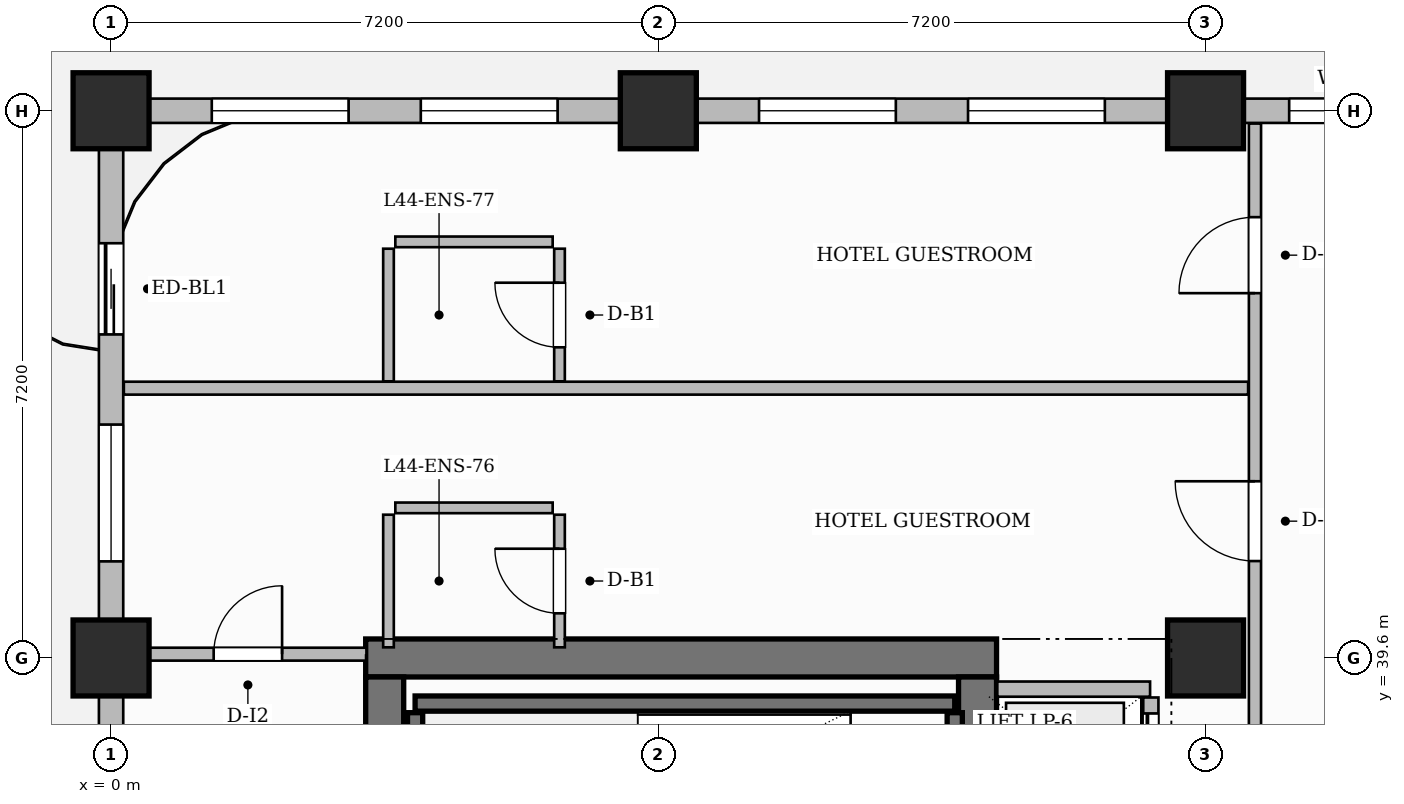
"""IFC4 building model, lengths in metres.
Left out: names, types, materials, properties, quantities, classifications, styles, units other than length and angle.
Written with IfcOpenShell. Run it as: python <this file> out.ifc"""

import sys

from ifc_helpers import new_model, si_unit, direction, frame, frame_2d, origin, origin_2d, place, context, subcontext, project, spatial, rectangle, extrude, source, transform, mapped, element, fill, save


model = new_model("IFC4")
c1 = context("Model", 3, precision=1e-05, world=origin(), true_north=direction((0.0, 1.0)))
c2 = subcontext(c1, "Body", "Model", "MODEL_VIEW")
j1 = project(units=[si_unit("LENGTHUNIT", "METRE"), si_unit("PLANEANGLEUNIT", "RADIAN")], contexts=[c1])
p1 = place(None, origin())
s1 = spatial("IfcSite", under=j1, at=p1, CompositionType="ELEMENT")
p2 = place(p1, origin())
s2 = spatial("IfcBuilding", under=s1, at=p2, CompositionType="ELEMENT")
p3 = place(p2, frame((0.0, 0.0, 177.25)))
s3 = spatial("IfcBuildingStorey", under=s2, at=p3, CompositionType="ELEMENT", Elevation=177.25)
p4 = place(p3, frame((3.35, 39.6, 0.0), z_axis=(0.0, 0.0, 1.0), x_axis=(1.0, 0.0, 0.0)))
e1 = element("IfcWall", 1, at=p4, inside=s3, PredefinedType="SHEAR", context=c2, shape_type="SweptSolid", body=[
    extrude(rectangle(XDim=8.3, YDim=0.5, at=frame_2d((4.15, 0.0))), origin(), (0.0, 0.0, 1.0), 3.85),
])
p5 = place(p3, frame((3.6, 25.45, 0.0), z_axis=(0.0, 0.0, 1.0), x_axis=(0.0, 1.0, 0.0)))
e2 = element("IfcWall", 2, at=p5, inside=s3, PredefinedType="SHEAR", context=c2, shape_type="SweptSolid", body=[
    extrude(rectangle(XDim=13.9, YDim=0.5, at=frame_2d((6.95, 0.0))), origin(), (0.0, 0.0, 1.0), 3.85),
])
p6 = place(p3, frame((11.4, 25.45, 0.0), z_axis=(0.0, 0.0, 1.0), x_axis=(0.0, 1.0, 0.0)))
e3 = element("IfcWall", 3, at=p6, inside=s3, PredefinedType="SHEAR", context=c2, shape_type="SweptSolid", body=[
    extrude(rectangle(XDim=13.9, YDim=0.5, at=frame_2d((6.95, 0.0))), origin(), (0.0, 0.0, 1.0), 3.85),
])
p7 = place(p6, frame((6.52, 0.0, 0.0)))
e4 = element("IfcOpeningElement", 4, at=p7, cuts=e3, PredefinedType="OPENING", context=c2, shape_type="SweptSolid", body=[
    extrude(rectangle(XDim=1.5, YDim=2.2, at=frame_2d((0.75, 1.1))), frame((0.0, 0.26, 0.0), z_axis=(0.0, -1.0, 0.0), x_axis=(1.0, 0.0, 0.0)), (0.0, 0.0, 1.0), 0.52),
])
m1 = source(origin(), c2, "Body", "SweptSolid", [
    extrude(rectangle(XDim=1.0, YDim=1.0, at=origin_2d()), origin(), (0.0, 0.0, 1.0), 3.85),
])
for number, where, z_axis, x_axis in (
    (5, (0.0, 39.6, 0.0), (0.0, 0.0, 1.0), (1.0, 0.0, 0.0)),
    (6, (0.0, 46.8, 0.0), (0.0, 0.0, 1.0), (1.0, 0.0, 0.0)),
    (7, (7.2, 46.8, 0.0), (0.0, 0.0, 1.0), (1.0, 0.0, 0.0)),
    (8, (14.4, 39.6, 0.0), (0.0, 0.0, 1.0), (1.0, 0.0, 0.0)),
    (9, (14.4, 46.8, 0.0), (0.0, 0.0, 1.0), (1.0, 0.0, 0.0)),
):
    element("IfcColumn", number, at=place(p3, frame(where, z_axis=z_axis, x_axis=x_axis)), inside=s3, PredefinedType="COLUMN", context=c2, shape_type="MappedRepresentation", body=[
        mapped(m1, transform((0.0, 0.0, 0.0), scale=1.0)),
    ])
p8 = place(p3, frame((4.0, 39.0, 0.0), z_axis=(0.0, 0.0, 1.0), x_axis=(1.0, 0.0, 0.0)))
e10 = element("IfcWall", 10, at=p8, inside=s3, PredefinedType="SHEAR", context=c2, shape_type="SweptSolid", body=[
    extrude(rectangle(XDim=7.1, YDim=0.2, at=frame_2d((3.55, 0.0))), origin(), (0.0, 0.0, 1.0), 3.85),
])
for number, where, z_axis, x_axis in (
    (11, (4.0, 36.18, 0.0), (0.0, 0.0, 1.0), (0.0, 1.0, 0.0)),
    (12, (11.1, 36.18, 0.0), (0.0, 0.0, 1.0), (0.0, 1.0, 0.0)),
):
    element("IfcWall", number, at=place(p3, frame(where, z_axis=z_axis, x_axis=x_axis)), inside=s3, PredefinedType="SHEAR", context=c2, shape_type="SweptSolid", body=[
        extrude(rectangle(XDim=2.7, YDim=0.2, at=frame_2d((1.35, 0.0))), origin(), (0.0, 0.0, 1.0), 3.85),
    ])
p9 = place(p3, frame((11.66, 39.19, 0.0), z_axis=(0.0, 0.0, 1.0), x_axis=(1.0, 0.0, 0.0)))
e13 = element("IfcWall", 13, at=p9, inside=s3, PredefinedType="PARTITIONING", context=c2, shape_type="SweptSolid", body=[
    extrude(rectangle(XDim=2.01, YDim=0.2, at=frame_2d((1.005, 0.0))), origin(), (0.0, 0.0, 1.0), 3.6),
])
p10 = place(p3, frame((13.68, 34.36, 0.0), z_axis=(0.0, 0.0, 1.0), x_axis=(0.0, 1.0, 0.0)))
e14 = element("IfcWall", 14, at=p10, inside=s3, PredefinedType="PARTITIONING", context=c2, shape_type="SweptSolid", body=[
    extrude(rectangle(XDim=4.72, YDim=0.2, at=frame_2d((2.36, 0.0))), origin(), (0.0, 0.0, 1.0), 3.6),
])
p11 = place(p10, frame((0.21, 0.0, 0.0)))
e15 = element("IfcOpeningElement", 15, at=p11, cuts=e14, PredefinedType="OPENING", context=c2, shape_type="SweptSolid", body=[
    extrude(rectangle(XDim=1.1, YDim=2.2, at=frame_2d((0.55, 1.1))), frame((0.0, 0.11, 0.0), z_axis=(0.0, -1.0, 0.0), x_axis=(1.0, 0.0, 0.0)), (0.0, 0.0, 1.0), 0.22),
])
p12 = place(p10, frame((1.81, 0.0, 0.0)))
e16 = element("IfcOpeningElement", 16, at=p12, cuts=e14, PredefinedType="OPENING", context=c2, shape_type="SweptSolid", body=[
    extrude(rectangle(XDim=1.1, YDim=2.2, at=frame_2d((0.55, 1.1))), frame((0.0, 0.11, 0.0), z_axis=(0.0, -1.0, 0.0), x_axis=(1.0, 0.0, 0.0)), (0.0, 0.0, 1.0), 0.22),
])
p13 = place(p10, frame((3.41, 0.0, 0.0)))
e17 = element("IfcOpeningElement", 17, at=p13, cuts=e14, PredefinedType="OPENING", context=c2, shape_type="SweptSolid", body=[
    extrude(rectangle(XDim=1.1, YDim=2.2, at=frame_2d((0.55, 1.1))), frame((0.0, 0.11, 0.0), z_axis=(0.0, -1.0, 0.0), x_axis=(1.0, 0.0, 0.0)), (0.0, 0.0, 1.0), 0.22),
])
p14 = place(p3, frame((0.24, 39.65, 0.0), z_axis=(0.0, 0.0, 1.0), x_axis=(1.0, 0.0, 0.0)))
e18 = element("IfcWall", 18, at=p14, inside=s3, PredefinedType="PARTITIONING", context=c2, shape_type="SweptSolid", body=[
    extrude(rectangle(XDim=3.12, YDim=0.17, at=frame_2d((1.56, 0.0))), origin(), (0.0, 0.0, 1.0), 3.6),
])
p15 = place(p14, frame((1.11, 0.0, 0.0)))
e19 = element("IfcOpeningElement", 19, at=p15, cuts=e18, PredefinedType="OPENING", context=c2, shape_type="SweptSolid", body=[
    extrude(rectangle(XDim=0.9, YDim=2.15, at=frame_2d((0.45, 1.075))), frame((0.0, 0.095, 0.0), z_axis=(0.0, -1.0, 0.0), x_axis=(1.0, 0.0, 0.0)), (0.0, 0.0, 1.0), 0.19),
])
p16 = place(p3, frame((15.05, 34.34, 0.0), z_axis=(0.0, 0.0, 1.0), x_axis=(0.0, 1.0, 0.0)))
e20 = element("IfcWall", 20, at=p16, inside=s3, PredefinedType="PARTITIONING", context=c2, shape_type="SweptSolid", body=[
    extrude(rectangle(XDim=12.292, YDim=0.16, at=frame_2d((6.146, 0.0))), origin(), (0.0, 0.0, 1.0), 3.6),
])
p17 = place(p16, frame((6.535, 0.0, 0.0)))
e21 = element("IfcOpeningElement", 21, at=p17, cuts=e20, PredefinedType="OPENING", context=c2, shape_type="SweptSolid", body=[
    extrude(rectangle(XDim=1.05, YDim=2.25, at=frame_2d((0.525, 1.125))), frame((0.0, 0.09, 0.0), z_axis=(0.0, -1.0, 0.0), x_axis=(1.0, 0.0, 0.0)), (0.0, 0.0, 1.0), 0.18),
])
p18 = place(p16, frame((10.06, 0.0, 0.0)))
e22 = element("IfcOpeningElement", 22, at=p18, cuts=e20, PredefinedType="OPENING", context=c2, shape_type="SweptSolid", body=[
    extrude(rectangle(XDim=1.0, YDim=2.2, at=frame_2d((0.5, 1.1))), frame((0.0, 0.09, 0.0), z_axis=(0.0, -1.0, 0.0), x_axis=(1.0, 0.0, 0.0)), (0.0, 0.0, 1.0), 0.18),
])
p19 = place(p3, frame((0.168, 43.15, 0.0), z_axis=(0.0, 0.0, 1.0), x_axis=(1.0, 0.0, 0.0)))
e23 = element("IfcWall", 23, at=p19, inside=s3, PredefinedType="PARTITIONING", context=c2, shape_type="SweptSolid", body=[
    extrude(rectangle(XDim=14.792, YDim=0.17, at=frame_2d((7.396, 0.0))), origin(), (0.0, 0.0, 1.0), 3.6),
])
p20 = place(p3, frame((3.65, 39.74, 0.0), z_axis=(0.0, 0.0, 1.0), x_axis=(0.0, 1.0, 0.0)))
e24 = element("IfcWall", 24, at=p20, inside=s3, PredefinedType="PARTITIONING", context=c2, shape_type="SweptSolid", body=[
    extrude(rectangle(XDim=1.745, YDim=0.14, at=frame_2d((0.873, 0.0))), origin(), (0.0, 0.0, 1.0), 3.6),
])
p21 = place(p3, frame((3.74, 41.575, 0.0), z_axis=(0.0, 0.0, 1.0), x_axis=(1.0, 0.0, 0.0)))
e25 = element("IfcWall", 25, at=p21, inside=s3, PredefinedType="PARTITIONING", context=c2, shape_type="SweptSolid", body=[
    extrude(rectangle(XDim=2.07, YDim=0.14, at=frame_2d((1.035, 0.0))), origin(), (0.0, 0.0, 1.0), 3.085),
])
p22 = place(p3, frame((5.9, 39.74, 0.0), z_axis=(0.0, 0.0, 1.0), x_axis=(0.0, 1.0, 0.0)))
e26 = element("IfcWall", 26, at=p22, inside=s3, PredefinedType="PARTITIONING", context=c2, shape_type="SweptSolid", body=[
    extrude(rectangle(XDim=1.745, YDim=0.14, at=frame_2d((0.873, 0.0))), origin(), (0.0, 0.0, 1.0), 3.6),
])
p23 = place(p22, frame((0.448, 0.0, 0.0)))
e27 = element("IfcOpeningElement", 27, at=p23, cuts=e26, PredefinedType="OPENING", context=c2, shape_type="SweptSolid", body=[
    extrude(rectangle(XDim=0.85, YDim=2.1, at=frame_2d((0.425, 1.05))), frame((0.0, 0.08, 0.0), z_axis=(0.0, -1.0, 0.0), x_axis=(1.0, 0.0, 0.0)), (0.0, 0.0, 1.0), 0.16),
])
p24 = place(p3, frame((3.65, 43.24, 0.0), z_axis=(0.0, 0.0, 1.0), x_axis=(0.0, 1.0, 0.0)))
e28 = element("IfcWall", 28, at=p24, inside=s3, PredefinedType="PARTITIONING", context=c2, shape_type="SweptSolid", body=[
    extrude(rectangle(XDim=1.745, YDim=0.14, at=frame_2d((0.873, 0.0))), origin(), (0.0, 0.0, 1.0), 3.6),
])
p25 = place(p3, frame((3.74, 45.075, 0.0), z_axis=(0.0, 0.0, 1.0), x_axis=(1.0, 0.0, 0.0)))
e29 = element("IfcWall", 29, at=p25, inside=s3, PredefinedType="PARTITIONING", context=c2, shape_type="SweptSolid", body=[
    extrude(rectangle(XDim=2.07, YDim=0.14, at=frame_2d((1.035, 0.0))), origin(), (0.0, 0.0, 1.0), 3.6),
])
p26 = place(p3, frame((5.9, 43.24, 0.0), z_axis=(0.0, 0.0, 1.0), x_axis=(0.0, 1.0, 0.0)))
e30 = element("IfcWall", 30, at=p26, inside=s3, PredefinedType="PARTITIONING", context=c2, shape_type="SweptSolid", body=[
    extrude(rectangle(XDim=1.745, YDim=0.14, at=frame_2d((0.873, 0.0))), origin(), (0.0, 0.0, 1.0), 3.6),
])
p27 = place(p26, frame((0.448, 0.0, 0.0)))
e31 = element("IfcOpeningElement", 31, at=p27, cuts=e30, PredefinedType="OPENING", context=c2, shape_type="SweptSolid", body=[
    extrude(rectangle(XDim=0.85, YDim=2.1, at=frame_2d((0.425, 1.05))), frame((0.0, 0.08, 0.0), z_axis=(0.0, -1.0, 0.0), x_axis=(1.0, 0.0, 0.0)), (0.0, 0.0, 1.0), 0.16),
])
p28 = place(p3, frame((0.0, 25.25, 0.0), z_axis=(0.0, 0.0, 1.0), x_axis=(0.0, 1.0, 0.0)))
e32 = element("IfcWall", 32, at=p28, inside=s3, PredefinedType="SOLIDWALL", context=c2, shape_type="SweptSolid", body=[
    extrude(rectangle(XDim=21.5, YDim=0.32, at=frame_2d((10.75, 0.0))), origin(), (0.0, 0.0, 1.0), 3.085),
])
p29 = place(p28, frame((18.607, 0.0, 0.0)))
e33 = element("IfcOpeningElement", 33, at=p29, cuts=e32, PredefinedType="OPENING", context=c2, shape_type="SweptSolid", body=[
    extrude(rectangle(XDim=1.2, YDim=2.2, at=frame_2d((0.6, 1.1))), frame((0.0, 0.17, 0.0), z_axis=(0.0, -1.0, 0.0), x_axis=(1.0, 0.0, 0.0)), (0.0, 0.0, 1.0), 0.34),
])
p30 = place(p28, frame((0.8, 0.0, 0.0)))
e34 = element("IfcOpeningElement", 34, at=p30, cuts=e32, PredefinedType="OPENING", context=c2, shape_type="SweptSolid", body=[
    extrude(rectangle(XDim=1.2, YDim=2.2, at=frame_2d((0.6, 1.1))), frame((0.0, 0.17, 0.0), z_axis=(0.0, -1.0, 0.0), x_axis=(1.0, 0.0, 0.0)), (0.0, 0.0, 1.0), 0.34),
])
p31 = place(p28, frame((3.425, 0.0, 0.8)))
e35 = element("IfcOpeningElement", 35, at=p31, cuts=e32, PredefinedType="OPENING", context=c2, shape_type="SweptSolid", body=[
    extrude(rectangle(XDim=1.8, YDim=1.85, at=frame_2d((0.9, 0.925))), frame((0.0, 0.17, 0.0), z_axis=(0.0, -1.0, 0.0), x_axis=(1.0, 0.0, 0.0)), (0.0, 0.0, 1.0), 0.34),
])
p32 = place(p28, frame((8.475, 0.0, 0.8)))
e36 = element("IfcOpeningElement", 36, at=p32, cuts=e32, PredefinedType="OPENING", context=c2, shape_type="SweptSolid", body=[
    extrude(rectangle(XDim=1.8, YDim=1.85, at=frame_2d((0.9, 0.925))), frame((0.0, 0.17, 0.0), z_axis=(0.0, -1.0, 0.0), x_axis=(1.0, 0.0, 0.0)), (0.0, 0.0, 1.0), 0.34),
])
p33 = place(p28, frame((11.225, 0.0, 0.8)))
e37 = element("IfcOpeningElement", 37, at=p33, cuts=e32, PredefinedType="OPENING", context=c2, shape_type="SweptSolid", body=[
    extrude(rectangle(XDim=1.8, YDim=1.85, at=frame_2d((0.9, 0.925))), frame((0.0, 0.17, 0.0), z_axis=(0.0, -1.0, 0.0), x_axis=(1.0, 0.0, 0.0)), (0.0, 0.0, 1.0), 0.34),
])
p34 = place(p28, frame((15.621, 0.0, 0.8)))
e38 = element("IfcOpeningElement", 38, at=p34, cuts=e32, PredefinedType="OPENING", context=c2, shape_type="SweptSolid", body=[
    extrude(rectangle(XDim=1.8, YDim=1.85, at=frame_2d((0.9, 0.925))), frame((0.0, 0.17, 0.0), z_axis=(0.0, -1.0, 0.0), x_axis=(1.0, 0.0, 0.0)), (0.0, 0.0, 1.0), 0.34),
])
p35 = place(p3, frame((0.0, 46.8, 0.0), z_axis=(0.0, 0.0, 1.0), x_axis=(1.0, 0.0, 0.0)))
e39 = element("IfcWall", 39, at=p35, inside=s3, PredefinedType="SOLIDWALL", context=c2, shape_type="SweptSolid", body=[
    extrude(rectangle(XDim=18.0, YDim=0.32, at=frame_2d((9.0, 0.0))), origin(), (0.0, 0.0, 1.0), 3.085),
])
p36 = place(p35, frame((1.325, 0.0, 0.8)))
e40 = element("IfcOpeningElement", 40, at=p36, cuts=e39, PredefinedType="OPENING", context=c2, shape_type="SweptSolid", body=[
    extrude(rectangle(XDim=1.8, YDim=1.85, at=frame_2d((0.9, 0.925))), frame((0.0, 0.17, 0.0), z_axis=(0.0, -1.0, 0.0), x_axis=(1.0, 0.0, 0.0)), (0.0, 0.0, 1.0), 0.34),
])
p37 = place(p35, frame((4.075, 0.0, 0.8)))
e41 = element("IfcOpeningElement", 41, at=p37, cuts=e39, PredefinedType="OPENING", context=c2, shape_type="SweptSolid", body=[
    extrude(rectangle(XDim=1.8, YDim=1.85, at=frame_2d((0.9, 0.925))), frame((0.0, 0.17, 0.0), z_axis=(0.0, -1.0, 0.0), x_axis=(1.0, 0.0, 0.0)), (0.0, 0.0, 1.0), 0.34),
])
p38 = place(p35, frame((8.525, 0.0, 0.8)))
e42 = element("IfcOpeningElement", 42, at=p38, cuts=e39, PredefinedType="OPENING", context=c2, shape_type="SweptSolid", body=[
    extrude(rectangle(XDim=1.8, YDim=1.85, at=frame_2d((0.9, 0.925))), frame((0.0, 0.17, 0.0), z_axis=(0.0, -1.0, 0.0), x_axis=(1.0, 0.0, 0.0)), (0.0, 0.0, 1.0), 0.34),
])
p39 = place(p35, frame((11.275, 0.0, 0.8)))
e43 = element("IfcOpeningElement", 43, at=p39, cuts=e39, PredefinedType="OPENING", context=c2, shape_type="SweptSolid", body=[
    extrude(rectangle(XDim=1.8, YDim=1.85, at=frame_2d((0.9, 0.925))), frame((0.0, 0.17, 0.0), z_axis=(0.0, -1.0, 0.0), x_axis=(1.0, 0.0, 0.0)), (0.0, 0.0, 1.0), 0.34),
])
p40 = place(p35, frame((15.5, 0.0, 0.8)))
e44 = element("IfcOpeningElement", 44, at=p40, cuts=e39, PredefinedType="OPENING", context=c2, shape_type="SweptSolid", body=[
    extrude(rectangle(XDim=1.4, YDim=1.85, at=frame_2d((0.7, 0.925))), frame((0.0, 0.17, 0.0), z_axis=(0.0, -1.0, 0.0), x_axis=(1.0, 0.0, 0.0)), (0.0, 0.0, 1.0), 0.34),
])
m2 = source(origin(), c2, "Body", "SweptSolid", [
    extrude(rectangle(XDim=0.9, YDim=2.15, at=frame_2d((0.45, 1.075))), frame((0.0, 0.025, 0.0), z_axis=(0.0, -1.0, 0.0), x_axis=(1.0, 0.0, 0.0)), (0.0, 0.0, 1.0), 0.05),
])
p41 = place(p15, origin())
e45 = element("IfcDoor", 45, at=p41, inside=s3, OperationType="SINGLE_SWING_RIGHT", PredefinedType="DOOR", context=c2, shape_type="MappedRepresentation", body=[
    mapped(m2, transform((0.0, 0.0, 0.0), scale=1.0)),
])
fill(e19, e45)
m3 = source(origin(), c2, "Body", "SweptSolid", [
    extrude(rectangle(XDim=0.85, YDim=2.1, at=frame_2d((0.425, 1.05))), frame((0.0, 0.025, 0.0), z_axis=(0.0, -1.0, 0.0), x_axis=(1.0, 0.0, 0.0)), (0.0, 0.0, 1.0), 0.05),
])
p42 = place(p23, origin())
e46 = element("IfcDoor", 46, at=p42, inside=s3, OperationType="SINGLE_SWING_RIGHT", PredefinedType="DOOR", context=c2, shape_type="MappedRepresentation", body=[
    mapped(m3, transform((0.0, 0.0, 0.0), scale=1.0)),
])
fill(e27, e46)
m4 = source(origin(), c2, "Body", "SweptSolid", [
    extrude(rectangle(XDim=1.05, YDim=2.25, at=frame_2d((0.525, 1.125))), frame((0.0, 0.025, 0.0), z_axis=(0.0, -1.0, 0.0), x_axis=(1.0, 0.0, 0.0)), (0.0, 0.0, 1.0), 0.05),
])
p43 = place(p17, origin())
e47 = element("IfcDoor", 47, at=p43, inside=s3, OperationType="SINGLE_SWING_RIGHT", PredefinedType="DOOR", context=c2, shape_type="MappedRepresentation", body=[
    mapped(m4, transform((0.0, 0.0, 0.0), scale=1.0)),
])
fill(e21, e47)
p44 = place(p27, origin())
e48 = element("IfcDoor", 48, at=p44, inside=s3, OperationType="SINGLE_SWING_RIGHT", PredefinedType="DOOR", context=c2, shape_type="MappedRepresentation", body=[
    mapped(m3, transform((0.0, 0.0, 0.0), scale=1.0)),
])
fill(e31, e48)
m5 = source(origin(), c2, "Body", "SweptSolid", [
    extrude(rectangle(XDim=1.0, YDim=2.2, at=frame_2d((0.5, 1.1))), frame((0.0, 0.025, 0.0), z_axis=(0.0, -1.0, 0.0), x_axis=(1.0, 0.0, 0.0)), (0.0, 0.0, 1.0), 0.05),
])
p45 = place(p18, origin())
e49 = element("IfcDoor", 49, at=p45, inside=s3, OperationType="SINGLE_SWING_LEFT", PredefinedType="DOOR", context=c2, shape_type="MappedRepresentation", body=[
    mapped(m5, transform((0.0, 0.0, 0.0), scale=1.0)),
])
fill(e22, e49)
m6 = source(origin(), c2, "Body", "SweptSolid", [
    extrude(rectangle(XDim=1.1, YDim=2.2, at=frame_2d((0.55, 1.1))), frame((0.0, 0.025, 0.0), z_axis=(0.0, -1.0, 0.0), x_axis=(1.0, 0.0, 0.0)), (0.0, 0.0, 1.0), 0.05),
])
p46 = place(p13, origin())
e50 = element("IfcDoor", 50, at=p46, inside=s3, OperationType="SLIDING_TO_LEFT", PredefinedType="DOOR", context=c2, shape_type="MappedRepresentation", body=[
    mapped(m6, transform((0.0, 0.0, 0.0), scale=1.0)),
])
fill(e17, e50)
m7 = source(origin(), c2, "Body", "SweptSolid", [
    extrude(rectangle(XDim=1.2, YDim=2.2, at=frame_2d((0.6, 1.1))), frame((0.0, 0.025, 0.0), z_axis=(0.0, -1.0, 0.0), x_axis=(1.0, 0.0, 0.0)), (0.0, 0.0, 1.0), 0.05),
])
p47 = place(p29, origin())
e51 = element("IfcDoor", 51, at=p47, inside=s3, OperationType="SLIDING_TO_LEFT", PredefinedType="DOOR", context=c2, shape_type="MappedRepresentation", body=[
    mapped(m7, transform((0.0, 0.0, 0.0), scale=1.0)),
])
fill(e33, e51)
m8 = source(origin(), c2, "Body", "SweptSolid", [
    extrude(rectangle(XDim=1.8, YDim=1.85, at=frame_2d((0.9, 0.925))), frame((0.0, 0.03, 0.0), z_axis=(0.0, -1.0, 0.0), x_axis=(1.0, 0.0, 0.0)), (0.0, 0.0, 1.0), 0.06),
])
p48 = place(p34, origin())
e52 = element("IfcWindow", 52, at=p48, inside=s3, PartitioningType="DOUBLE_PANEL_VERTICAL", PredefinedType="WINDOW", context=c2, shape_type="MappedRepresentation", body=[
    mapped(m8, transform((0.0, 0.0, 0.0), scale=1.0)),
])
fill(e38, e52)
p49 = place(p36, origin())
e53 = element("IfcWindow", 53, at=p49, inside=s3, PartitioningType="DOUBLE_PANEL_VERTICAL", PredefinedType="WINDOW", context=c2, shape_type="MappedRepresentation", body=[
    mapped(m8, transform((0.0, 0.0, 0.0), scale=1.0)),
])
fill(e40, e53)
p50 = place(p37, origin())
e54 = element("IfcWindow", 54, at=p50, inside=s3, PartitioningType="DOUBLE_PANEL_VERTICAL", PredefinedType="WINDOW", context=c2, shape_type="MappedRepresentation", body=[
    mapped(m8, transform((0.0, 0.0, 0.0), scale=1.0)),
])
fill(e41, e54)
p51 = place(p38, origin())
e55 = element("IfcWindow", 55, at=p51, inside=s3, PartitioningType="DOUBLE_PANEL_VERTICAL", PredefinedType="WINDOW", context=c2, shape_type="MappedRepresentation", body=[
    mapped(m8, transform((0.0, 0.0, 0.0), scale=1.0)),
])
fill(e42, e55)
p52 = place(p39, origin())
e56 = element("IfcWindow", 56, at=p52, inside=s3, PartitioningType="DOUBLE_PANEL_VERTICAL", PredefinedType="WINDOW", context=c2, shape_type="MappedRepresentation", body=[
    mapped(m8, transform((0.0, 0.0, 0.0), scale=1.0)),
])
fill(e43, e56)
m9 = source(origin(), c2, "Body", "SweptSolid", [
    extrude(rectangle(XDim=1.4, YDim=1.85, at=frame_2d((0.7, 0.925))), frame((0.0, 0.03, 0.0), z_axis=(0.0, -1.0, 0.0), x_axis=(1.0, 0.0, 0.0)), (0.0, 0.0, 1.0), 0.06),
])
p53 = place(p40, origin())
e57 = element("IfcWindow", 57, at=p53, inside=s3, PartitioningType="SINGLE_PANEL", PredefinedType="WINDOW", context=c2, shape_type="MappedRepresentation", body=[
    mapped(m9, transform((0.0, 0.0, 0.0), scale=1.0)),
])
fill(e44, e57)
save(model, sys.argv[1])
